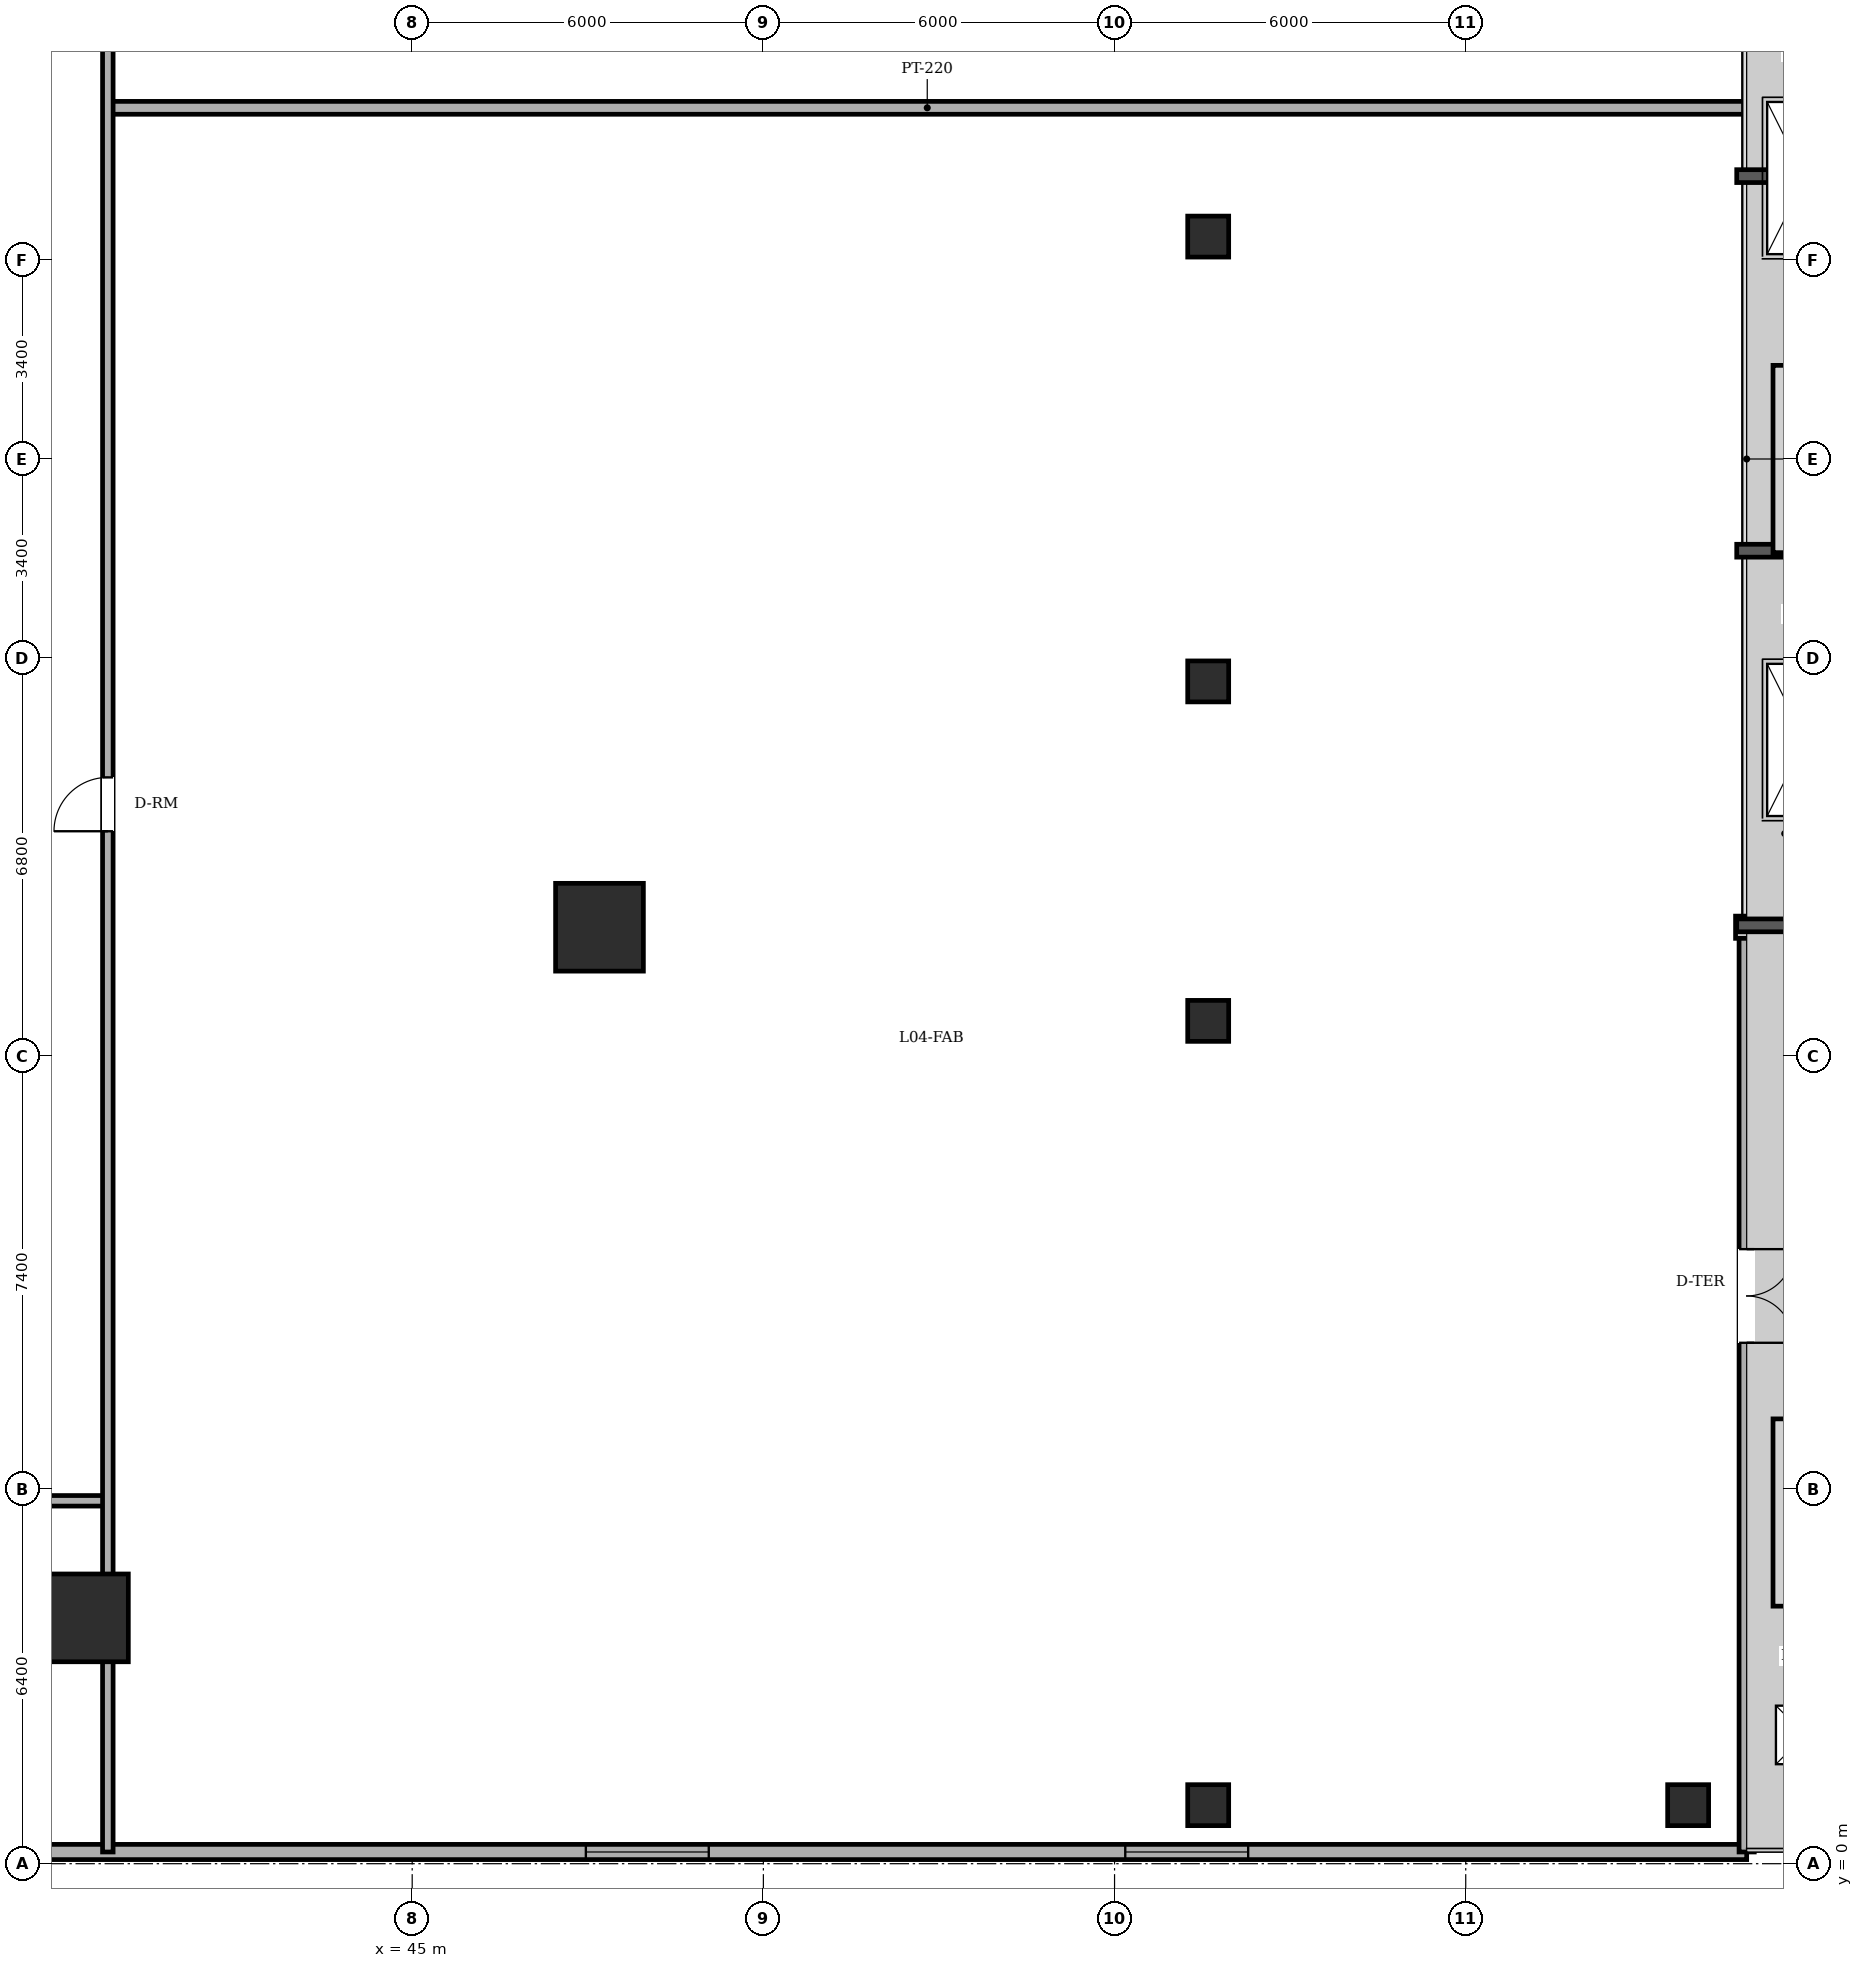
"""IFC4 building model, lengths in metres.
Left out: names, types, materials, properties, quantities, classifications, styles, units other than length and angle.
Written with IfcOpenShell. Run it as: python <this file> out.ifc"""

import sys

from ifc_helpers import new_model, si_unit, direction, frame, frame_2d, origin, origin_2d, place, context, subcontext, project, spatial, rectangle, circle, extrude, element, fill, save


model = new_model("IFC4")
c1 = context("Model", 3, precision=1e-05, world=origin(), true_north=direction((0.0, 1.0)))
c2 = subcontext(c1, "Body", "Model", "MODEL_VIEW")
j1 = project(units=[si_unit("LENGTHUNIT", "METRE"), si_unit("PLANEANGLEUNIT", "RADIAN")], contexts=[c1])
p1 = place(None, origin())
s1 = spatial("IfcSite", under=j1, at=p1, CompositionType="ELEMENT")
p2 = place(p1, origin())
s2 = spatial("IfcBuilding", under=s1, at=p2, CompositionType="ELEMENT")
p3 = place(p2, frame((0.0, 0.0, 14.7)))
s3 = spatial("IfcBuildingStorey", under=s2, at=p3, CompositionType="ELEMENT", Elevation=14.7)
for number, where, z_axis, x_axis in (
    (1, (39.4, 4.2, 0.0), (0.0, 0.0, 1.0), (1.0, 0.0, 0.0)),
    (2, (48.2, 16.0, 0.0), (0.0, 0.0, 1.0), (1.0, 0.0, 0.0)),
):
    element("IfcColumn", number, at=place(p3, frame(where, z_axis=z_axis, x_axis=x_axis)), inside=s3, PredefinedType="COLUMN", context=c2, shape_type="SweptSolid", body=[
        extrude(circle(Radius=0.75, at=origin_2d()), origin(), (0.0, 0.0, 1.0), 4.65),
    ])
for number, where, z_axis, x_axis in (
    (3, (58.6, 1.0, 0.0), (0.0, 0.0, 1.0), (1.0, 0.0, 0.0)),
    (4, (58.6, 20.2, 0.0), (0.0, 0.0, 1.0), (1.0, 0.0, 0.0)),
    (5, (58.6, 27.8, 0.0), (0.0, 0.0, 1.0), (1.0, 0.0, 0.0)),
    (6, (58.6, 14.4, 0.0), (0.0, 0.0, 1.0), (1.0, 0.0, 0.0)),
    (7, (66.8, 1.0, 0.0), (0.0, 0.0, 1.0), (1.0, 0.0, 0.0)),
):
    element("IfcColumn", number, at=place(p3, frame(where, z_axis=z_axis, x_axis=x_axis)), inside=s3, PredefinedType="COLUMN", context=c2, shape_type="SweptSolid", body=[
        extrude(rectangle(XDim=0.7, YDim=0.7, at=origin_2d()), origin(), (0.0, 0.0, 1.0), 4.65),
    ])
p4 = place(p3, frame((67.8, 0.2, 0.0), z_axis=(0.0, 0.0, 1.0), x_axis=(-1.0, 0.0, 0.0)))
e8 = element("IfcWall", 8, at=p4, inside=s3, PredefinedType="SOLIDWALL", context=c2, shape_type="SweptSolid", body=[
    extrude(rectangle(XDim=66.2, YDim=0.26, at=frame_2d((33.1, 0.0))), origin(), (0.0, 0.0, 1.0), 4.45),
])
p5 = place(p4, frame((8.517, 0.0, 0.9)))
e9 = element("IfcOpeningElement", 9, at=p5, cuts=e8, PredefinedType="OPENING", context=c2, shape_type="SweptSolid", body=[
    extrude(rectangle(XDim=2.1, YDim=2.0, at=frame_2d((1.05, 1.0))), frame((0.0, 0.14, 0.0), z_axis=(0.0, -1.0, 0.0), x_axis=(1.0, 0.0, 0.0)), (0.0, 0.0, 1.0), 0.28),
])
p6 = place(p4, frame((17.733, 0.0, 0.9)))
e10 = element("IfcOpeningElement", 10, at=p6, cuts=e8, PredefinedType="OPENING", context=c2, shape_type="SweptSolid", body=[
    extrude(rectangle(XDim=2.1, YDim=2.0, at=frame_2d((1.05, 1.0))), frame((0.0, 0.14, 0.0), z_axis=(0.0, -1.0, 0.0), x_axis=(1.0, 0.0, 0.0)), (0.0, 0.0, 1.0), 0.28),
])
p7 = place(p4, frame((33.083, 0.0, 0.9)))
e11 = element("IfcOpeningElement", 11, at=p7, cuts=e8, PredefinedType="OPENING", context=c2, shape_type="SweptSolid", body=[
    extrude(rectangle(XDim=2.1, YDim=2.0, at=frame_2d((1.05, 1.0))), frame((0.0, 0.14, 0.0), z_axis=(0.0, -1.0, 0.0), x_axis=(1.0, 0.0, 0.0)), (0.0, 0.0, 1.0), 0.28),
])
p8 = place(p4, frame((39.217, 0.0, 0.9)))
e12 = element("IfcOpeningElement", 12, at=p8, cuts=e8, PredefinedType="OPENING", context=c2, shape_type="SweptSolid", body=[
    extrude(rectangle(XDim=2.1, YDim=2.0, at=frame_2d((1.05, 1.0))), frame((0.0, 0.14, 0.0), z_axis=(0.0, -1.0, 0.0), x_axis=(1.0, 0.0, 0.0)), (0.0, 0.0, 1.0), 0.28),
])
p9 = place(p4, frame((51.833, 0.0, 0.9)))
e13 = element("IfcOpeningElement", 13, at=p9, cuts=e8, PredefinedType="OPENING", context=c2, shape_type="SweptSolid", body=[
    extrude(rectangle(XDim=2.1, YDim=2.0, at=frame_2d((1.05, 1.0))), frame((0.0, 0.14, 0.0), z_axis=(0.0, -1.0, 0.0), x_axis=(1.0, 0.0, 0.0)), (0.0, 0.0, 1.0), 0.28),
])
p10 = place(p3, frame((67.8, 16.0, 0.0), z_axis=(0.0, 0.0, 1.0), x_axis=(0.0, -1.0, 0.0)))
e14 = element("IfcWall", 14, at=p10, inside=s3, PredefinedType="SOLIDWALL", context=c2, shape_type="SweptSolid", body=[
    extrude(rectangle(XDim=15.8, YDim=0.26, at=frame_2d((7.9, 0.0))), origin(), (0.0, 0.0, 1.0), 4.45),
])
p11 = place(p10, frame((5.5, 0.0, 0.0)))
e15 = element("IfcOpeningElement", 15, at=p11, cuts=e14, PredefinedType="OPENING", context=c2, shape_type="SweptSolid", body=[
    extrude(rectangle(XDim=1.6, YDim=2.3, at=frame_2d((0.8, 1.15))), frame((0.0, 0.14, 0.0), z_axis=(0.0, -1.0, 0.0), x_axis=(1.0, 0.0, 0.0)), (0.0, 0.0, 1.0), 0.28),
])
p12 = place(p3, frame((17.89, 6.2, 0.0), z_axis=(0.0, 0.0, 1.0), x_axis=(1.0, 0.0, 0.0)))
e16 = element("IfcWall", 16, at=p12, inside=s3, PredefinedType="PARTITIONING", context=c2, shape_type="SweptSolid", body=[
    extrude(rectangle(XDim=21.91, YDim=0.18, at=frame_2d((10.955, 0.0))), origin(), (0.0, 0.0, 1.0), 4.45),
])
p13 = place(p3, frame((39.8, 30.0, 0.0), z_axis=(0.0, 0.0, 1.0), x_axis=(1.0, 0.0, 0.0)))
e17 = element("IfcWall", 17, at=p13, inside=s3, PredefinedType="PARTITIONING", context=c2, shape_type="SweptSolid", body=[
    extrude(rectangle(XDim=28.0, YDim=0.22, at=frame_2d((14.0, 0.0))), origin(), (0.0, 0.0, 1.0), 4.45),
])
p14 = place(p3, frame((39.8, 0.2, 0.0), z_axis=(0.0, 0.0, 1.0), x_axis=(0.0, 1.0, 0.0)))
e18 = element("IfcWall", 18, at=p14, inside=s3, PredefinedType="PARTITIONING", context=c2, shape_type="SweptSolid", body=[
    extrude(rectangle(XDim=47.6, YDim=0.18, at=frame_2d((23.8, 0.0))), origin(), (0.0, 0.0, 1.0), 4.45),
])
p15 = place(p14, frame((17.44, 0.0, 0.0)))
e19 = element("IfcOpeningElement", 19, at=p15, cuts=e18, PredefinedType="OPENING", context=c2, shape_type="SweptSolid", body=[
    extrude(rectangle(XDim=0.92, YDim=2.1, at=frame_2d((0.46, 1.05))), frame((0.0, 0.1, 0.0), z_axis=(0.0, -1.0, 0.0), x_axis=(1.0, 0.0, 0.0)), (0.0, 0.0, 1.0), 0.2),
])
p16 = place(p14, frame((35.2, 0.0, 0.0)))
e20 = element("IfcOpeningElement", 20, at=p16, cuts=e18, PredefinedType="OPENING", context=c2, shape_type="SweptSolid", body=[
    extrude(rectangle(XDim=1.0, YDim=2.15, at=frame_2d((0.5, 1.075))), frame((0.0, 0.1, 0.0), z_axis=(0.0, -1.0, 0.0), x_axis=(1.0, 0.0, 0.0)), (0.0, 0.0, 1.0), 0.2),
])
p17 = place(p11, origin())
e21 = element("IfcDoor", 21, at=p17, inside=s3, OperationType="DOUBLE_DOOR_SINGLE_SWING", PredefinedType="DOOR", context=c2, shape_type="SweptSolid", body=[
    extrude(rectangle(XDim=1.6, YDim=2.3, at=frame_2d((0.8, 1.15))), frame((0.0, 0.025, 0.0), z_axis=(0.0, -1.0, 0.0), x_axis=(1.0, 0.0, 0.0)), (0.0, 0.0, 1.0), 0.05),
])
fill(e15, e21)
p18 = place(p5, origin())
e22 = element("IfcWindow", 22, at=p18, inside=s3, PartitioningType="DOUBLE_PANEL_VERTICAL", PredefinedType="WINDOW", context=c2, shape_type="SweptSolid", body=[
    extrude(rectangle(XDim=2.1, YDim=2.0, at=frame_2d((1.05, 1.0))), frame((0.0, 0.03, 0.0), z_axis=(0.0, -1.0, 0.0), x_axis=(1.0, 0.0, 0.0)), (0.0, 0.0, 1.0), 0.06),
])
fill(e9, e22)
p19 = place(p6, origin())
e23 = element("IfcWindow", 23, at=p19, inside=s3, PartitioningType="DOUBLE_PANEL_VERTICAL", PredefinedType="WINDOW", context=c2, shape_type="SweptSolid", body=[
    extrude(rectangle(XDim=2.1, YDim=2.0, at=frame_2d((1.05, 1.0))), frame((0.0, 0.03, 0.0), z_axis=(0.0, -1.0, 0.0), x_axis=(1.0, 0.0, 0.0)), (0.0, 0.0, 1.0), 0.06),
])
fill(e10, e23)
p20 = place(p3, frame((0.0, 0.0, -0.21)))
p21 = place(p20, frame((68.8, 19.2, 0.0)))
p22 = place(p21, frame((0.0, 0.0, 0.16)))
e24 = element("IfcWindow", 24, at=p22, inside=s3, PartitioningType="SINGLE_PANEL", PredefinedType="SKYLIGHT", context=c2, shape_type="SweptSolid", body=[
    extrude(rectangle(XDim=1.3, YDim=2.6, at=origin_2d()), origin(), (0.0, 0.0, 1.0), 0.05),
])
p23 = place(p20, frame((68.8, 28.8, 0.0)))
p24 = place(p23, frame((0.0, 0.0, 0.16)))
e25 = element("IfcWindow", 25, at=p24, inside=s3, PartitioningType="SINGLE_PANEL", PredefinedType="SKYLIGHT", context=c2, shape_type="SweptSolid", body=[
    extrude(rectangle(XDim=1.3, YDim=2.6, at=origin_2d()), origin(), (0.0, 0.0, 1.0), 0.05),
])
p25 = place(p20, frame((68.8, 2.2, 0.0)))
p26 = place(p25, frame((0.0, 0.0, 0.16)))
e26 = element("IfcDoor", 26, at=p26, inside=s3, OperationType="SINGLE_SWING_LEFT", PredefinedType="TRAPDOOR", context=c2, shape_type="SweptSolid", body=[
    extrude(rectangle(XDim=1.0, YDim=1.0, at=origin_2d()), origin(), (0.0, 0.0, 1.0), 0.05),
])
p27 = place(p15, origin())
e27 = element("IfcDoor", 27, at=p27, inside=s3, OperationType="SINGLE_SWING_LEFT", PredefinedType="DOOR", context=c2, shape_type="SweptSolid", body=[
    extrude(rectangle(XDim=0.92, YDim=2.1, at=frame_2d((0.46, 1.05))), frame((0.0, 0.025, 0.0), z_axis=(0.0, -1.0, 0.0), x_axis=(1.0, 0.0, 0.0)), (0.0, 0.0, 1.0), 0.05),
])
fill(e19, e27)
save(model, sys.argv[1])
